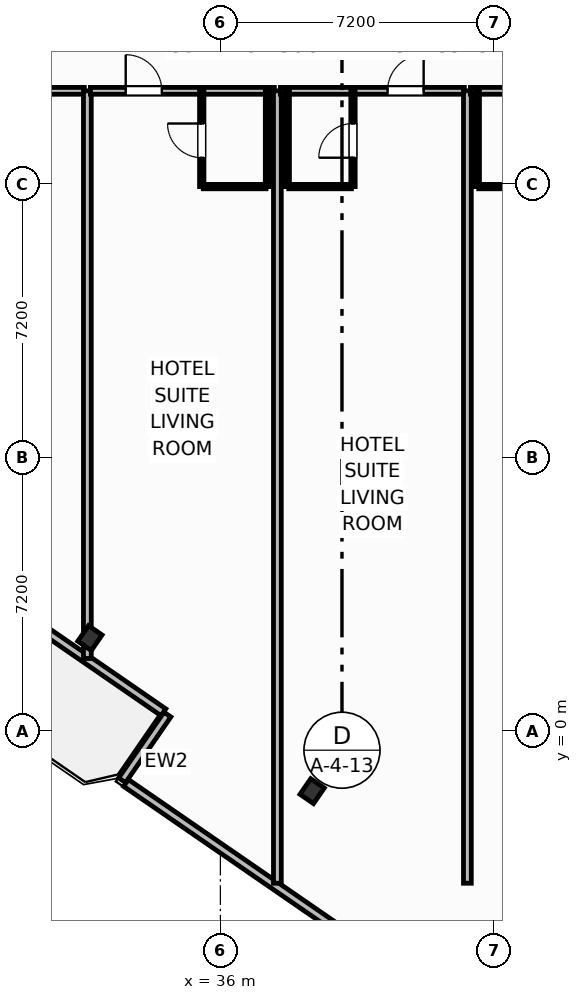
"""IFC4 building model, lengths in metres.
Left out: names, types, materials, properties, quantities, classifications, styles, units other than length and angle.
Written with IfcOpenShell. Run it as: python <this file> out.ifc"""

import sys

from ifc_helpers import new_model, si_unit, direction, frame, frame_2d, origin, origin_2d, place, context, subcontext, project, spatial, rectangle, i_section, extrude, element, fill, save


model = new_model("IFC4")
c1 = context("Model", 3, precision=1e-05, world=origin(), true_north=direction((0.0, 1.0)))
c2 = subcontext(c1, "Body", "Model", "MODEL_VIEW")
j1 = project(units=[si_unit("LENGTHUNIT", "METRE"), si_unit("PLANEANGLEUNIT", "RADIAN")], contexts=[c1])
p1 = place(None, origin())
s1 = spatial("IfcSite", under=j1, at=p1, CompositionType="ELEMENT")
p2 = place(p1, origin())
s2 = spatial("IfcBuilding", under=s1, at=p2, CompositionType="ELEMENT")
p3 = place(p2, frame((0.0, 0.0, 30.7)))
s3 = spatial("IfcBuildingStorey", under=s2, at=p3, CompositionType="ELEMENT", Elevation=30.7)
for number, where, z_axis, x_axis in (
    (1, (32.568, 2.45, 0.0), (0.0, 0.0, 1.0), (0.824, -0.567, 0.0)),
    (2, (38.415, -1.577, 0.0), (0.0, 0.0, 1.0), (0.824, -0.567, 0.0)),
):
    element("IfcColumn", number, at=place(p3, frame(where, z_axis=z_axis, x_axis=x_axis)), inside=s3, PredefinedType="COLUMN", context=c2, shape_type="SweptSolid", body=[
        extrude(i_section(OverallWidth=0.432, OverallDepth=0.498, WebThickness=0.056, FlangeThickness=0.089, FilletRadius=0.025, at=origin_2d()), origin(), (0.0, 0.0, 1.0), 3.7),
    ])
p4 = place(p3, frame((34.502, 0.499, 0.0), z_axis=(0.0, 0.0, 1.0), x_axis=(-0.823534636215, 0.567265989598, 0.0)))
e3 = element("IfcWall", 3, at=p4, inside=s3, PredefinedType="SOLIDWALL", context=c2, shape_type="SweptSolid", body=[
    extrude(rectangle(XDim=6.0, YDim=0.22, at=frame_2d((3.0, 0.0))), origin(), (0.0, 0.0, 1.0), 2.73),
])
p5 = place(p4, frame((4.1, 0.0, 0.0)))
e4 = element("IfcOpeningElement", 4, at=p5, cuts=e3, PredefinedType="OPENING", context=c2, shape_type="SweptSolid", body=[
    extrude(rectangle(XDim=1.5, YDim=2.25, at=frame_2d((0.75, 1.125))), frame((0.0, 0.12, 0.0), z_axis=(0.0, -1.0, 0.0), x_axis=(1.0, 0.0, 0.0)), (0.0, 0.0, 1.0), 0.24),
])
p6 = place(p3, frame((34.606, 0.439, 0.0), z_axis=(0.0, 0.0, 1.0), x_axis=(-0.567219383419, -0.823566737474, 0.0)))
e5 = element("IfcWall", 5, at=p6, inside=s3, PredefinedType="SOLIDWALL", context=c2, shape_type="SweptSolid", body=[
    extrude(rectangle(XDim=2.1, YDim=0.22, at=frame_2d((1.05, 0.0))), origin(), (0.0, 0.0, 1.0), 2.73),
])
p7 = place(p3, frame((33.518, -1.362, 0.0), z_axis=(0.0, 0.0, 1.0), x_axis=(0.82353935489, -0.567259139148, 0.0)))
e6 = element("IfcWall", 6, at=p7, inside=s3, PredefinedType="SOLIDWALL", context=c2, shape_type="SweptSolid", body=[
    extrude(rectangle(XDim=23.147, YDim=0.22, at=frame_2d((11.573, 0.0))), origin(), (0.0, 0.0, 1.0), 2.73),
])
p8 = place(p7, frame((10.749, 0.0, 0.8)))
e7 = element("IfcOpeningElement", 7, at=p8, cuts=e6, PredefinedType="OPENING", context=c2, shape_type="SweptSolid", body=[
    extrude(rectangle(XDim=1.65, YDim=1.65, at=frame_2d((0.825, 0.825))), frame((0.0, 0.12, 0.0), z_axis=(0.0, -1.0, 0.0), x_axis=(1.0, 0.0, 0.0)), (0.0, 0.0, 1.0), 0.24),
])
p9 = place(p3, frame((27.58, 16.85, 0.0), z_axis=(0.0, 0.0, 1.0), x_axis=(1.0, 0.0, 0.0)))
e8 = element("IfcWall", 8, at=p9, inside=s3, PredefinedType="PARTITIONING", context=c2, shape_type="SweptSolid", body=[
    extrude(rectangle(XDim=4.84, YDim=0.18, at=frame_2d((2.42, 0.0))), origin(), (0.0, 0.0, 1.0), 3.45),
])
p10 = place(p9, frame((2.819, 0.0, 0.0)))
e9 = element("IfcOpeningElement", 9, at=p10, cuts=e8, PredefinedType="OPENING", context=c2, shape_type="SweptSolid", body=[
    extrude(rectangle(XDim=0.95, YDim=2.15, at=frame_2d((0.475, 1.075))), frame((0.0, 0.1, 0.0), z_axis=(0.0, -1.0, 0.0), x_axis=(1.0, 0.0, 0.0)), (0.0, 0.0, 1.0), 0.2),
])
p11 = place(p3, frame((32.5, 1.914, 0.0), z_axis=(0.0, 0.0, 1.0), x_axis=(0.0, 1.0, 0.0)))
e10 = element("IfcWall", 10, at=p11, inside=s3, PredefinedType="PARTITIONING", context=c2, shape_type="SweptSolid", body=[
    extrude(rectangle(XDim=14.936, YDim=0.205, at=frame_2d((7.468, 0.0))), origin(), (0.0, 0.0, 1.0), 2.58),
])
p12 = place(p3, frame((32.58, 16.85, 0.0), z_axis=(0.0, 0.0, 1.0), x_axis=(1.0, 0.0, 0.0)))
e11 = element("IfcWall", 11, at=p12, inside=s3, PredefinedType="PARTITIONING", context=c2, shape_type="SweptSolid", body=[
    extrude(rectangle(XDim=4.84, YDim=0.18, at=frame_2d((2.42, 0.0))), origin(), (0.0, 0.0, 1.0), 3.45),
])
p13 = place(p12, frame((0.929, 0.0, 0.0)))
e12 = element("IfcOpeningElement", 12, at=p13, cuts=e11, PredefinedType="OPENING", context=c2, shape_type="SweptSolid", body=[
    extrude(rectangle(XDim=0.95, YDim=2.15, at=frame_2d((0.475, 1.075))), frame((0.0, 0.1, 0.0), z_axis=(0.0, -1.0, 0.0), x_axis=(1.0, 0.0, 0.0)), (0.0, 0.0, 1.0), 0.2),
])
p14 = place(p3, frame((35.55, 14.33, 0.0), z_axis=(0.0, 0.0, 1.0), x_axis=(1.0, 0.0, 0.0)))
e13 = element("IfcWall", 13, at=p14, inside=s3, PredefinedType="PARTITIONING", context=c2, shape_type="SweptSolid", body=[
    extrude(rectangle(XDim=1.65, YDim=0.115, at=frame_2d((0.825, 0.0))), origin(), (0.0, 0.0, 1.0), 3.45),
])
p15 = place(p3, frame((35.51, 14.33, 0.0), z_axis=(0.0, 0.0, 1.0), x_axis=(0.0, 1.0, 0.0)))
e14 = element("IfcWall", 14, at=p15, inside=s3, PredefinedType="PARTITIONING", context=c2, shape_type="SweptSolid", body=[
    extrude(rectangle(XDim=2.52, YDim=0.115, at=frame_2d((1.26, 0.0))), origin(), (0.0, 0.0, 1.0), 3.45),
])
p16 = place(p15, frame((0.76, 0.0, 0.0)))
e15 = element("IfcOpeningElement", 15, at=p16, cuts=e14, PredefinedType="OPENING", context=c2, shape_type="SweptSolid", body=[
    extrude(rectangle(XDim=0.9, YDim=2.05, at=frame_2d((0.45, 1.025))), frame((0.0, 0.067, 0.0), z_axis=(0.0, -1.0, 0.0), x_axis=(1.0, 0.0, 0.0)), (0.0, 0.0, 1.0), 0.135),
])
p17 = place(p3, frame((37.24, 14.33, 0.0), z_axis=(0.0, 0.0, 1.0), x_axis=(0.0, 1.0, 0.0)))
e16 = element("IfcWall", 16, at=p17, inside=s3, PredefinedType="PARTITIONING", context=c2, shape_type="SweptSolid", body=[
    extrude(rectangle(XDim=2.52, YDim=0.115, at=frame_2d((1.26, 0.0))), origin(), (0.0, 0.0, 1.0), 3.45),
])
p18 = place(p3, frame((37.5, -4.0, 0.0), z_axis=(0.0, 0.0, 1.0), x_axis=(0.0, 1.0, 0.0)))
e17 = element("IfcWall", 17, at=p18, inside=s3, PredefinedType="PARTITIONING", context=c2, shape_type="SweptSolid", body=[
    extrude(rectangle(XDim=20.85, YDim=0.205, at=frame_2d((10.425, 0.0))), origin(), (0.0, 0.0, 1.0), 3.45),
])
p19 = place(p3, frame((37.58, 16.85, 0.0), z_axis=(0.0, 0.0, 1.0), x_axis=(1.0, 0.0, 0.0)))
e18 = element("IfcWall", 18, at=p19, inside=s3, PredefinedType="PARTITIONING", context=c2, shape_type="SweptSolid", body=[
    extrude(rectangle(XDim=4.84, YDim=0.18, at=frame_2d((2.42, 0.0))), origin(), (0.0, 0.0, 1.0), 3.45),
])
p20 = place(p19, frame((2.819, 0.0, 0.0)))
e19 = element("IfcOpeningElement", 19, at=p20, cuts=e18, PredefinedType="OPENING", context=c2, shape_type="SweptSolid", body=[
    extrude(rectangle(XDim=0.95, YDim=2.15, at=frame_2d((0.475, 1.075))), frame((0.0, 0.1, 0.0), z_axis=(0.0, -1.0, 0.0), x_axis=(1.0, 0.0, 0.0)), (0.0, 0.0, 1.0), 0.2),
])
p21 = place(p3, frame((37.8, 14.33, 0.0), z_axis=(0.0, 0.0, 1.0), x_axis=(1.0, 0.0, 0.0)))
e20 = element("IfcWall", 20, at=p21, inside=s3, PredefinedType="PARTITIONING", context=c2, shape_type="SweptSolid", body=[
    extrude(rectangle(XDim=1.65, YDim=0.115, at=frame_2d((0.825, 0.0))), origin(), (0.0, 0.0, 1.0), 3.45),
])
p22 = place(p3, frame((39.49, 14.33, 0.0), z_axis=(0.0, 0.0, 1.0), x_axis=(0.0, 1.0, 0.0)))
e21 = element("IfcWall", 21, at=p22, inside=s3, PredefinedType="PARTITIONING", context=c2, shape_type="SweptSolid", body=[
    extrude(rectangle(XDim=2.52, YDim=0.115, at=frame_2d((1.26, 0.0))), origin(), (0.0, 0.0, 1.0), 3.45),
])
p23 = place(p22, frame((0.76, 0.0, 0.0)))
e22 = element("IfcOpeningElement", 22, at=p23, cuts=e21, PredefinedType="OPENING", context=c2, shape_type="SweptSolid", body=[
    extrude(rectangle(XDim=0.9, YDim=2.05, at=frame_2d((0.45, 1.025))), frame((0.0, 0.067, 0.0), z_axis=(0.0, -1.0, 0.0), x_axis=(1.0, 0.0, 0.0)), (0.0, 0.0, 1.0), 0.135),
])
p24 = place(p3, frame((37.76, 14.33, 0.0), z_axis=(0.0, 0.0, 1.0), x_axis=(0.0, 1.0, 0.0)))
e23 = element("IfcWall", 23, at=p24, inside=s3, PredefinedType="PARTITIONING", context=c2, shape_type="SweptSolid", body=[
    extrude(rectangle(XDim=2.52, YDim=0.115, at=frame_2d((1.26, 0.0))), origin(), (0.0, 0.0, 1.0), 3.45),
])
p25 = place(p3, frame((42.5, -4.0, 0.0), z_axis=(0.0, 0.0, 1.0), x_axis=(0.0, 1.0, 0.0)))
e24 = element("IfcWall", 24, at=p25, inside=s3, PredefinedType="PARTITIONING", context=c2, shape_type="SweptSolid", body=[
    extrude(rectangle(XDim=20.85, YDim=0.205, at=frame_2d((10.425, 0.0))), origin(), (0.0, 0.0, 1.0), 2.58),
])
p26 = place(p3, frame((42.58, 16.85, 0.0), z_axis=(0.0, 0.0, 1.0), x_axis=(1.0, 0.0, 0.0)))
e25 = element("IfcWall", 25, at=p26, inside=s3, PredefinedType="PARTITIONING", context=c2, shape_type="SweptSolid", body=[
    extrude(rectangle(XDim=4.84, YDim=0.18, at=frame_2d((2.42, 0.0))), origin(), (0.0, 0.0, 1.0), 3.45),
])
p27 = place(p26, frame((2.819, 0.0, 0.0)))
e26 = element("IfcOpeningElement", 26, at=p27, cuts=e25, PredefinedType="OPENING", context=c2, shape_type="SweptSolid", body=[
    extrude(rectangle(XDim=0.95, YDim=2.15, at=frame_2d((0.475, 1.075))), frame((0.0, 0.1, 0.0), z_axis=(0.0, -1.0, 0.0), x_axis=(1.0, 0.0, 0.0)), (0.0, 0.0, 1.0), 0.2),
])
p28 = place(p3, frame((42.8, 14.33, 0.0), z_axis=(0.0, 0.0, 1.0), x_axis=(1.0, 0.0, 0.0)))
e27 = element("IfcWall", 27, at=p28, inside=s3, PredefinedType="PARTITIONING", context=c2, shape_type="SweptSolid", body=[
    extrude(rectangle(XDim=1.65, YDim=0.115, at=frame_2d((0.825, 0.0))), origin(), (0.0, 0.0, 1.0), 3.45),
])
p29 = place(p3, frame((42.76, 14.33, 0.0), z_axis=(0.0, 0.0, 1.0), x_axis=(0.0, 1.0, 0.0)))
e28 = element("IfcWall", 28, at=p29, inside=s3, PredefinedType="PARTITIONING", context=c2, shape_type="SweptSolid", body=[
    extrude(rectangle(XDim=2.52, YDim=0.115, at=frame_2d((1.26, 0.0))), origin(), (0.0, 0.0, 1.0), 3.45),
])
p30 = place(p13, origin())
e29 = element("IfcDoor", 29, at=p30, inside=s3, OperationType="SINGLE_SWING_LEFT", PredefinedType="DOOR", context=c2, shape_type="SweptSolid", body=[
    extrude(rectangle(XDim=0.95, YDim=2.15, at=frame_2d((0.475, 1.075))), frame((0.0, 0.025, 0.0), z_axis=(0.0, -1.0, 0.0), x_axis=(1.0, 0.0, 0.0)), (0.0, 0.0, 1.0), 0.05),
])
fill(e12, e29)
p31 = place(p16, origin())
e30 = element("IfcDoor", 30, at=p31, inside=s3, OperationType="SINGLE_SWING_RIGHT", PredefinedType="DOOR", context=c2, shape_type="SweptSolid", body=[
    extrude(rectangle(XDim=0.9, YDim=2.05, at=frame_2d((0.45, 1.025))), frame((0.0, 0.025, 0.0), z_axis=(0.0, -1.0, 0.0), x_axis=(1.0, 0.0, 0.0)), (0.0, 0.0, 1.0), 0.05),
])
fill(e15, e30)
p32 = place(p20, origin())
e31 = element("IfcDoor", 31, at=p32, inside=s3, OperationType="SINGLE_SWING_RIGHT", PredefinedType="DOOR", context=c2, shape_type="SweptSolid", body=[
    extrude(rectangle(XDim=0.95, YDim=2.15, at=frame_2d((0.475, 1.075))), frame((0.0, 0.025, 0.0), z_axis=(0.0, -1.0, 0.0), x_axis=(1.0, 0.0, 0.0)), (0.0, 0.0, 1.0), 0.05),
])
fill(e19, e31)
p33 = place(p23, origin())
e32 = element("IfcDoor", 32, at=p33, inside=s3, OperationType="SINGLE_SWING_LEFT", PredefinedType="DOOR", context=c2, shape_type="SweptSolid", body=[
    extrude(rectangle(XDim=0.9, YDim=2.05, at=frame_2d((0.45, 1.025))), frame((0.0, 0.025, 0.0), z_axis=(0.0, -1.0, 0.0), x_axis=(1.0, 0.0, 0.0)), (0.0, 0.0, 1.0), 0.05),
])
fill(e22, e32)
save(model, sys.argv[1])
